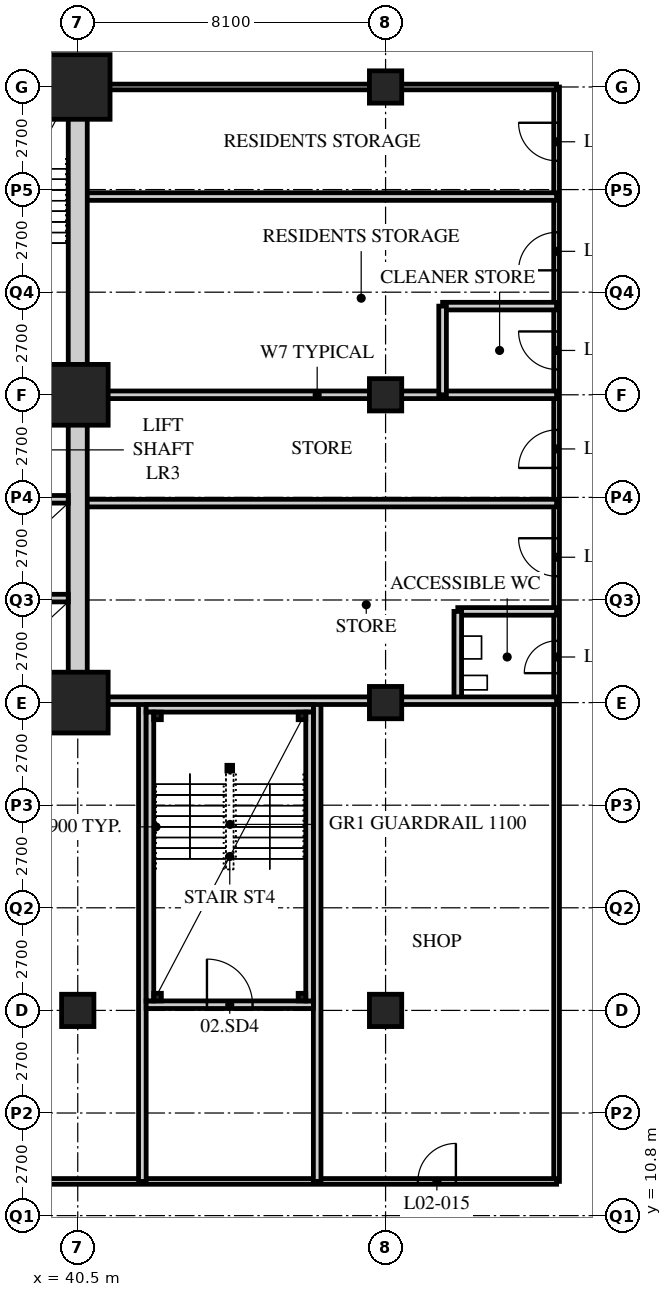
"""IFC4 building model, lengths in metres.
Left out: names, types, materials, properties, quantities, classifications, styles, units other than length and angle.
Written with IfcOpenShell. Run it as: python <this file> out.ifc"""

import sys

from ifc_helpers import new_model, si_unit, direction, frame, frame_2d, origin, origin_2d, place, context, subcontext, project, spatial, rectangle, hollow_rectangle, extrude, element, fill, save


model = new_model("IFC4")
c1 = context("Model", 3, precision=1e-05, world=origin(), true_north=direction((0.0, 1.0)))
c2 = subcontext(c1, "Body", "Model", "MODEL_VIEW")
j1 = project(units=[si_unit("LENGTHUNIT", "METRE"), si_unit("PLANEANGLEUNIT", "RADIAN")], contexts=[c1])
p1 = place(None, origin())
s1 = spatial("IfcSite", under=j1, at=p1, CompositionType="ELEMENT")
p2 = place(p1, origin())
s2 = spatial("IfcBuilding", under=s1, at=p2, CompositionType="ELEMENT")
p3 = place(p2, frame((0.0, 0.0, 11.4)))
s3 = spatial("IfcBuildingStorey", under=s2, at=p3, CompositionType="ELEMENT", Elevation=11.4)
p4 = place(p3, frame((40.5, 16.2, 0.0), z_axis=(0.0, 0.0, 1.0), x_axis=(1.0, 0.0, 0.0)))
e1 = element("IfcColumn", 1, at=p4, inside=s3, PredefinedType="COLUMN", context=c2, shape_type="SweptSolid", body=[
    extrude(hollow_rectangle(XDim=0.85, YDim=0.85, WallThickness=0.085, at=origin_2d()), origin(), (0.0, 0.0, 1.0), 5.4),
])
for number, where, z_axis, x_axis in (
    (2, (40.5, 24.3, 0.0), (0.0, 0.0, 1.0), (1.0, 0.0, 0.0)),
    (3, (40.5, 32.4, 0.0), (0.0, 0.0, 1.0), (1.0, 0.0, 0.0)),
):
    element("IfcColumn", number, at=place(p3, frame(where, z_axis=z_axis, x_axis=x_axis)), inside=s3, PredefinedType="COLUMN", context=c2, shape_type="SweptSolid", body=[
        extrude(hollow_rectangle(XDim=1.6, YDim=1.6, WallThickness=0.15, at=origin_2d()), origin(), (0.0, 0.0, 1.0), 5.4),
    ])
p5 = place(p3, frame((40.5, 40.5, 0.0), z_axis=(0.0, 0.0, 1.0), x_axis=(1.0, 0.0, 0.0)))
e4 = element("IfcColumn", 4, at=p5, inside=s3, PredefinedType="COLUMN", context=c2, shape_type="SweptSolid", body=[
    extrude(hollow_rectangle(XDim=1.7, YDim=1.7, WallThickness=0.16, at=origin_2d()), origin(), (0.0, 0.0, 1.0), 5.4),
])
for number, where, z_axis, x_axis in (
    (5, (48.6, 16.2, 0.0), (0.0, 0.0, 1.0), (1.0, 0.0, 0.0)),
    (6, (48.6, 24.3, 0.0), (0.0, 0.0, 1.0), (1.0, 0.0, 0.0)),
    (7, (48.6, 32.4, 0.0), (0.0, 0.0, 1.0), (1.0, 0.0, 0.0)),
    (8, (48.6, 40.5, 0.0), (0.0, 0.0, 1.0), (1.0, 0.0, 0.0)),
):
    element("IfcColumn", number, at=place(p3, frame(where, z_axis=z_axis, x_axis=x_axis)), inside=s3, PredefinedType="COLUMN", context=c2, shape_type="SweptSolid", body=[
        extrude(hollow_rectangle(XDim=0.85, YDim=0.85, WallThickness=0.085, at=origin_2d()), origin(), (0.0, 0.0, 1.0), 5.4),
    ])
p6 = place(p3, frame((53.1, 11.7, 0.0), z_axis=(0.0, 0.0, 1.0), x_axis=(0.0, 1.0, 0.0)))
e9 = element("IfcWall", 9, at=p6, inside=s3, PredefinedType="PARTITIONING", context=c2, shape_type="SweptSolid", body=[
    extrude(rectangle(XDim=28.8, YDim=0.15, at=frame_2d((14.4, 0.0))), origin(), (0.0, 0.0, 1.0), 5.15),
])
p7 = place(p6, frame((13.375, 0.0, 0.0)))
e10 = element("IfcOpeningElement", 10, at=p7, cuts=e9, PredefinedType="OPENING", context=c2, shape_type="SweptSolid", body=[
    extrude(rectangle(XDim=0.85, YDim=2.1, at=frame_2d((0.425, 1.05))), frame((0.0, 0.085, 0.0), z_axis=(0.0, -1.0, 0.0), x_axis=(1.0, 0.0, 0.0)), (0.0, 0.0, 1.0), 0.17),
])
p8 = place(p6, frame((15.925, 0.0, 0.0)))
e11 = element("IfcOpeningElement", 11, at=p8, cuts=e9, PredefinedType="OPENING", context=c2, shape_type="SweptSolid", body=[
    extrude(rectangle(XDim=1.0, YDim=2.1, at=frame_2d((0.5, 1.05))), frame((0.0, 0.085, 0.0), z_axis=(0.0, -1.0, 0.0), x_axis=(1.0, 0.0, 0.0)), (0.0, 0.0, 1.0), 0.17),
])
p9 = place(p6, frame((18.775, 0.0, 0.0)))
e12 = element("IfcOpeningElement", 12, at=p9, cuts=e9, PredefinedType="OPENING", context=c2, shape_type="SweptSolid", body=[
    extrude(rectangle(XDim=1.0, YDim=2.1, at=frame_2d((0.5, 1.05))), frame((0.0, 0.085, 0.0), z_axis=(0.0, -1.0, 0.0), x_axis=(1.0, 0.0, 0.0)), (0.0, 0.0, 1.0), 0.17),
])
p10 = place(p6, frame((21.367, 0.0, 0.0)))
e13 = element("IfcOpeningElement", 13, at=p10, cuts=e9, PredefinedType="OPENING", context=c2, shape_type="SweptSolid", body=[
    extrude(rectangle(XDim=1.0, YDim=2.1, at=frame_2d((0.5, 1.05))), frame((0.0, 0.085, 0.0), z_axis=(0.0, -1.0, 0.0), x_axis=(1.0, 0.0, 0.0)), (0.0, 0.0, 1.0), 0.17),
])
p11 = place(p6, frame((23.975, 0.0, 0.0)))
e14 = element("IfcOpeningElement", 14, at=p11, cuts=e9, PredefinedType="OPENING", context=c2, shape_type="SweptSolid", body=[
    extrude(rectangle(XDim=1.0, YDim=2.1, at=frame_2d((0.5, 1.05))), frame((0.0, 0.085, 0.0), z_axis=(0.0, -1.0, 0.0), x_axis=(1.0, 0.0, 0.0)), (0.0, 0.0, 1.0), 0.17),
])
p12 = place(p6, frame((26.858, 0.0, 0.0)))
e15 = element("IfcOpeningElement", 15, at=p12, cuts=e9, PredefinedType="OPENING", context=c2, shape_type="SweptSolid", body=[
    extrude(rectangle(XDim=1.0, YDim=2.1, at=frame_2d((0.5, 1.05))), frame((0.0, 0.085, 0.0), z_axis=(0.0, -1.0, 0.0), x_axis=(1.0, 0.0, 0.0)), (0.0, 0.0, 1.0), 0.17),
])
p13 = place(p3, frame((53.1, 40.5, 0.0), z_axis=(0.0, 0.0, 1.0), x_axis=(-1.0, 0.0, 0.0)))
e16 = element("IfcWall", 16, at=p13, inside=s3, PredefinedType="PARTITIONING", context=c2, shape_type="SweptSolid", body=[
    extrude(rectangle(XDim=12.4, YDim=0.15, at=frame_2d((6.2, 0.0))), origin(), (0.0, 0.0, 1.0), 4.538),
])
p14 = place(p3, frame((29.56, 11.7, 0.0), z_axis=(0.0, 0.0, 1.0), x_axis=(1.0, 0.0, 0.0)))
e17 = element("IfcWall", 17, at=p14, inside=s3, PredefinedType="PARTITIONING", context=c2, shape_type="SweptSolid", body=[
    extrude(rectangle(XDim=23.54, YDim=0.15, at=frame_2d((11.77, 0.0))), origin(), (0.0, 0.0, 1.0), 5.15),
])
p15 = place(p14, frame((5.815, 0.0, 0.0)))
e18 = element("IfcOpeningElement", 18, at=p15, cuts=e17, PredefinedType="OPENING", context=c2, shape_type="SweptSolid", body=[
    extrude(rectangle(XDim=1.0, YDim=2.1, at=frame_2d((0.5, 1.05))), frame((0.0, 0.085, 0.0), z_axis=(0.0, -1.0, 0.0), x_axis=(1.0, 0.0, 0.0)), (0.0, 0.0, 1.0), 0.17),
])
p16 = place(p14, frame((19.89, 0.0, 0.0)))
e19 = element("IfcOpeningElement", 19, at=p16, cuts=e17, PredefinedType="OPENING", context=c2, shape_type="SweptSolid", body=[
    extrude(rectangle(XDim=1.0, YDim=2.1, at=frame_2d((0.5, 1.05))), frame((0.0, 0.085, 0.0), z_axis=(0.0, -1.0, 0.0), x_axis=(1.0, 0.0, 0.0)), (0.0, 0.0, 1.0), 0.17),
])
p17 = place(p3, frame((40.5, 32.4, 0.0), z_axis=(0.0, 0.0, 1.0), x_axis=(1.0, 0.0, 0.0)))
e20 = element("IfcWall", 20, at=p17, inside=s3, PredefinedType="SOLIDWALL", context=c2, shape_type="SweptSolid", body=[
    extrude(rectangle(XDim=12.6, YDim=0.2, at=frame_2d((6.3, 0.0))), origin(), (0.0, 0.0, 1.0), 4.538),
])
p18 = place(p3, frame((53.1, 26.7, 0.0), z_axis=(0.0, 0.0, 1.0), x_axis=(-1.0, 0.0, 0.0)))
e21 = element("IfcWall", 21, at=p18, inside=s3, PredefinedType="SOLIDWALL", context=c2, shape_type="SweptSolid", body=[
    extrude(rectangle(XDim=2.6, YDim=0.2, at=frame_2d((1.3, 0.0))), origin(), (0.0, 0.0, 1.0), 5.15),
])
p19 = place(p3, frame((50.5, 24.3, 0.0), z_axis=(0.0, 0.0, 1.0), x_axis=(0.0, 1.0, 0.0)))
e22 = element("IfcWall", 22, at=p19, inside=s3, PredefinedType="SOLIDWALL", context=c2, shape_type="SweptSolid", body=[
    extrude(rectangle(XDim=2.4, YDim=0.2, at=frame_2d((1.2, 0.0))), origin(), (0.0, 0.0, 1.0), 5.15),
])
p20 = place(p3, frame((53.1, 29.55, 0.0), z_axis=(0.0, 0.0, 1.0), x_axis=(-1.0, 0.0, 0.0)))
e23 = element("IfcWall", 23, at=p20, inside=s3, PredefinedType="SOLIDWALL", context=c2, shape_type="SweptSolid", body=[
    extrude(rectangle(XDim=12.6, YDim=0.2, at=frame_2d((6.3, 0.0))), origin(), (0.0, 0.0, 1.0), 5.15),
])
p21 = place(p3, frame((53.1, 34.733, 0.0), z_axis=(0.0, 0.0, 1.0), x_axis=(-1.0, 0.0, 0.0)))
e24 = element("IfcWall", 24, at=p21, inside=s3, PredefinedType="SOLIDWALL", context=c2, shape_type="SweptSolid", body=[
    extrude(rectangle(XDim=3.0, YDim=0.2, at=frame_2d((1.5, 0.0))), origin(), (0.0, 0.0, 1.0), 5.15),
])
p22 = place(p3, frame((50.1, 32.4, 0.0), z_axis=(0.0, 0.0, 1.0), x_axis=(0.0, 1.0, 0.0)))
e25 = element("IfcWall", 25, at=p22, inside=s3, PredefinedType="SOLIDWALL", context=c2, shape_type="SweptSolid", body=[
    extrude(rectangle(XDim=2.333, YDim=0.2, at=frame_2d((1.167, 0.0))), origin(), (0.0, 0.0, 1.0), 5.15),
])
for number, where, z_axis, x_axis in (
    (26, (53.1, 37.617, 0.0), (0.0, 0.0, 1.0), (-1.0, 0.0, 0.0)),
    (27, (42.2, 11.7, 0.0), (0.0, 0.0, 1.0), (0.0, 1.0, 0.0)),
    (28, (46.8, 11.7, 0.0), (0.0, 0.0, 1.0), (0.0, 1.0, 0.0)),
):
    element("IfcWall", number, at=place(p3, frame(where, z_axis=z_axis, x_axis=x_axis)), inside=s3, PredefinedType="SOLIDWALL", context=c2, shape_type="SweptSolid", body=[
        extrude(rectangle(XDim=12.6, YDim=0.2, at=frame_2d((6.3, 0.0))), origin(), (0.0, 0.0, 1.0), 5.15),
    ])
p23 = place(p3, frame((40.5, 24.35, 0.0), z_axis=(0.0, 0.0, 1.0), x_axis=(1.0, 0.0, 0.0)))
e29 = element("IfcWall", 29, at=p23, inside=s3, PredefinedType="SOLIDWALL", context=c2, shape_type="SweptSolid", body=[
    extrude(rectangle(XDim=12.6, YDim=0.2, at=frame_2d((6.3, 0.0))), origin(), (0.0, 0.0, 1.0), 4.538),
])
p24 = place(p3, frame((15.95, 24.3, 0.0), z_axis=(0.0, 0.0, 1.0), x_axis=(1.0, 0.0, 0.0)))
e30 = element("IfcWall", 30, at=p24, inside=s3, PredefinedType="SOLIDWALL", context=c2, shape_type="SweptSolid", body=[
    extrude(rectangle(XDim=24.8, YDim=0.5, at=frame_2d((12.4, 0.0))), origin(), (0.0, 0.0, 1.0), 4.5),
])
p25 = place(p24, frame((11.5, 0.0, 0.0)))
e31 = element("IfcOpeningElement", 31, at=p25, cuts=e30, PredefinedType="OPENING", context=c2, shape_type="SweptSolid", body=[
    extrude(rectangle(XDim=1.8, YDim=2.4, at=frame_2d((0.9, 1.2))), frame((0.0, 0.26, 0.0), z_axis=(0.0, -1.0, 0.0), x_axis=(1.0, 0.0, 0.0)), (0.0, 0.0, 1.0), 0.52),
])
p26 = place(p3, frame((15.95, 40.5, 0.0), z_axis=(0.0, 0.0, 1.0), x_axis=(1.0, 0.0, 0.0)))
e32 = element("IfcWall", 32, at=p26, inside=s3, PredefinedType="SOLIDWALL", context=c2, shape_type="SweptSolid", body=[
    extrude(rectangle(XDim=24.8, YDim=0.5, at=frame_2d((12.4, 0.0))), origin(), (0.0, 0.0, 1.0), 4.5),
])
p27 = place(p26, frame((11.5, 0.0, 0.0)))
e33 = element("IfcOpeningElement", 33, at=p27, cuts=e32, PredefinedType="OPENING", context=c2, shape_type="SweptSolid", body=[
    extrude(rectangle(XDim=1.8, YDim=2.4, at=frame_2d((0.9, 1.2))), frame((0.0, 0.26, 0.0), z_axis=(0.0, -1.0, 0.0), x_axis=(1.0, 0.0, 0.0)), (0.0, 0.0, 1.0), 0.52),
])
p28 = place(p3, frame((40.5, 24.55, 0.0), z_axis=(0.0, 0.0, 1.0), x_axis=(0.0, 1.0, 0.0)))
e34 = element("IfcWall", 34, at=p28, inside=s3, PredefinedType="SOLIDWALL", context=c2, shape_type="SweptSolid", body=[
    extrude(rectangle(XDim=15.7, YDim=0.5, at=frame_2d((7.85, 0.0))), origin(), (0.0, 0.0, 1.0), 4.538),
])
p29 = place(p3, frame((32.3, 32.4, 0.0), z_axis=(0.0, 0.0, 1.0), x_axis=(1.0, 0.0, 0.0)))
e35 = element("IfcWall", 35, at=p29, inside=s3, PredefinedType="SOLIDWALL", context=c2, shape_type="SweptSolid", body=[
    extrude(rectangle(XDim=7.95, YDim=0.2, at=frame_2d((3.975, 0.0))), origin(), (0.0, 0.0, 1.0), 4.45),
])
for number, where, z_axis, x_axis in (
    (36, (37.65, 27.05, 0.0), (0.0, 0.0, 1.0), (1.0, 0.0, 0.0)),
    (37, (37.65, 29.65, 0.0), (0.0, 0.0, 1.0), (1.0, 0.0, 0.0)),
):
    element("IfcWall", number, at=place(p3, frame(where, z_axis=z_axis, x_axis=x_axis)), inside=s3, PredefinedType="SOLIDWALL", context=c2, shape_type="SweptSolid", body=[
        extrude(rectangle(XDim=2.6, YDim=0.2, at=frame_2d((1.3, 0.0))), origin(), (0.0, 0.0, 1.0), 5.15),
    ])
p30 = place(p3, frame((42.3, 16.35, 0.0), z_axis=(0.0, 0.0, 1.0), x_axis=(1.0, 0.0, 0.0)))
e38 = element("IfcWall", 38, at=p30, inside=s3, PredefinedType="SOLIDWALL", context=c2, shape_type="SweptSolid", body=[
    extrude(rectangle(XDim=4.4, YDim=0.2, at=frame_2d((2.2, 0.0))), origin(), (0.0, 0.0, 1.0), 4.538),
])
p31 = place(p30, frame((1.6, 0.0, 0.0)))
e39 = element("IfcOpeningElement", 39, at=p31, cuts=e38, PredefinedType="OPENING", context=c2, shape_type="SweptSolid", body=[
    extrude(rectangle(XDim=1.2, YDim=2.1, at=frame_2d((0.6, 1.05))), frame((0.0, 0.11, 0.0), z_axis=(0.0, -1.0, 0.0), x_axis=(1.0, 0.0, 0.0)), (0.0, 0.0, 1.0), 0.22),
])
p32 = place(p3, frame((42.3, 24.15, 0.0), z_axis=(0.0, 0.0, 1.0), x_axis=(1.0, 0.0, 0.0)))
e40 = element("IfcWall", 40, at=p32, inside=s3, PredefinedType="SOLIDWALL", context=c2, shape_type="SweptSolid", body=[
    extrude(rectangle(XDim=4.4, YDim=0.2, at=frame_2d((2.2, 0.0))), origin(), (0.0, 0.0, 1.0), 4.538),
])
for number, where, z_axis, x_axis in (
    (41, (42.4, 16.45, 0.0), (0.0, 0.0, 1.0), (0.0, 1.0, 0.0)),
    (42, (46.6, 16.45, 0.0), (0.0, 0.0, 1.0), (0.0, 1.0, 0.0)),
):
    element("IfcWall", number, at=place(p3, frame(where, z_axis=z_axis, x_axis=x_axis)), inside=s3, PredefinedType="SOLIDWALL", context=c2, shape_type="SweptSolid", body=[
        extrude(rectangle(XDim=7.6, YDim=0.2, at=frame_2d((3.8, 0.0))), origin(), (0.0, 0.0, 1.0), 5.15),
    ])
for number, where, z_axis, x_axis in (
    (43, (42.6, 23.95, 0.0), (0.0, 0.0, 1.0), (1.0, 0.0, 0.0)),
    (44, (46.4, 23.95, 0.0), (0.0, 0.0, 1.0), (1.0, 0.0, 0.0)),
    (45, (42.6, 16.55, 0.0), (0.0, 0.0, 1.0), (1.0, 0.0, 0.0)),
    (46, (46.4, 16.55, 0.0), (0.0, 0.0, 1.0), (1.0, 0.0, 0.0)),
):
    element("IfcColumn", number, at=place(p3, frame(where, z_axis=z_axis, x_axis=x_axis)), inside=s3, PredefinedType="COLUMN", context=c2, shape_type="SweptSolid", body=[
        extrude(hollow_rectangle(XDim=0.2, YDim=0.2, WallThickness=0.012, at=origin_2d()), origin(), (0.0, 0.0, 1.0), 5.4),
    ])
p33 = place(p3, frame((44.5, 22.575, 0.0), z_axis=(0.0, 0.0, 1.0), x_axis=(1.0, 0.0, 0.0)))
e47 = element("IfcColumn", 47, at=p33, inside=s3, PredefinedType="COLUMN", context=c2, shape_type="SweptSolid", body=[
    extrude(hollow_rectangle(XDim=0.15, YDim=0.15, WallThickness=0.01, at=origin_2d()), origin(), (0.0, 0.0, 1.0), 5.4),
])
p34 = place(p7, origin())
e48 = element("IfcDoor", 48, at=p34, inside=s3, OperationType="SINGLE_SWING_LEFT", PredefinedType="DOOR", context=c2, shape_type="SweptSolid", body=[
    extrude(rectangle(XDim=0.85, YDim=2.1, at=frame_2d((0.425, 1.05))), frame((0.0, 0.025, 0.0), z_axis=(0.0, -1.0, 0.0), x_axis=(1.0, 0.0, 0.0)), (0.0, 0.0, 1.0), 0.05),
])
fill(e10, e48)
p35 = place(p8, origin())
e49 = element("IfcDoor", 49, at=p35, inside=s3, OperationType="SINGLE_SWING_RIGHT", PredefinedType="DOOR", context=c2, shape_type="SweptSolid", body=[
    extrude(rectangle(XDim=1.0, YDim=2.1, at=frame_2d((0.5, 1.05))), frame((0.0, 0.025, 0.0), z_axis=(0.0, -1.0, 0.0), x_axis=(1.0, 0.0, 0.0)), (0.0, 0.0, 1.0), 0.05),
])
fill(e11, e49)
p36 = place(p9, origin())
e50 = element("IfcDoor", 50, at=p36, inside=s3, OperationType="SINGLE_SWING_LEFT", PredefinedType="DOOR", context=c2, shape_type="SweptSolid", body=[
    extrude(rectangle(XDim=1.0, YDim=2.1, at=frame_2d((0.5, 1.05))), frame((0.0, 0.025, 0.0), z_axis=(0.0, -1.0, 0.0), x_axis=(1.0, 0.0, 0.0)), (0.0, 0.0, 1.0), 0.05),
])
fill(e12, e50)
p37 = place(p10, origin())
e51 = element("IfcDoor", 51, at=p37, inside=s3, OperationType="SINGLE_SWING_RIGHT", PredefinedType="DOOR", context=c2, shape_type="SweptSolid", body=[
    extrude(rectangle(XDim=1.0, YDim=2.1, at=frame_2d((0.5, 1.05))), frame((0.0, 0.025, 0.0), z_axis=(0.0, -1.0, 0.0), x_axis=(1.0, 0.0, 0.0)), (0.0, 0.0, 1.0), 0.05),
])
fill(e13, e51)
p38 = place(p11, origin())
e52 = element("IfcDoor", 52, at=p38, inside=s3, OperationType="SINGLE_SWING_LEFT", PredefinedType="DOOR", context=c2, shape_type="SweptSolid", body=[
    extrude(rectangle(XDim=1.0, YDim=2.1, at=frame_2d((0.5, 1.05))), frame((0.0, 0.025, 0.0), z_axis=(0.0, -1.0, 0.0), x_axis=(1.0, 0.0, 0.0)), (0.0, 0.0, 1.0), 0.05),
])
fill(e14, e52)
p39 = place(p12, origin())
e53 = element("IfcDoor", 53, at=p39, inside=s3, OperationType="SINGLE_SWING_RIGHT", PredefinedType="DOOR", context=c2, shape_type="SweptSolid", body=[
    extrude(rectangle(XDim=1.0, YDim=2.1, at=frame_2d((0.5, 1.05))), frame((0.0, 0.025, 0.0), z_axis=(0.0, -1.0, 0.0), x_axis=(1.0, 0.0, 0.0)), (0.0, 0.0, 1.0), 0.05),
])
fill(e15, e53)
p40 = place(p16, origin())
e54 = element("IfcDoor", 54, at=p40, inside=s3, OperationType="SINGLE_SWING_RIGHT", PredefinedType="DOOR", context=c2, shape_type="SweptSolid", body=[
    extrude(rectangle(XDim=1.0, YDim=2.1, at=frame_2d((0.5, 1.05))), frame((0.0, 0.025, 0.0), z_axis=(0.0, -1.0, 0.0), x_axis=(1.0, 0.0, 0.0)), (0.0, 0.0, 1.0), 0.05),
])
fill(e19, e54)
p41 = place(p31, origin())
e55 = element("IfcDoor", 55, at=p41, inside=s3, OperationType="SINGLE_SWING_LEFT", PredefinedType="DOOR", context=c2, shape_type="SweptSolid", body=[
    extrude(rectangle(XDim=1.2, YDim=2.1, at=frame_2d((0.6, 1.05))), frame((0.0, 0.025, 0.0), z_axis=(0.0, -1.0, 0.0), x_axis=(1.0, 0.0, 0.0)), (0.0, 0.0, 1.0), 0.05),
])
fill(e39, e55)
save(model, sys.argv[1])
